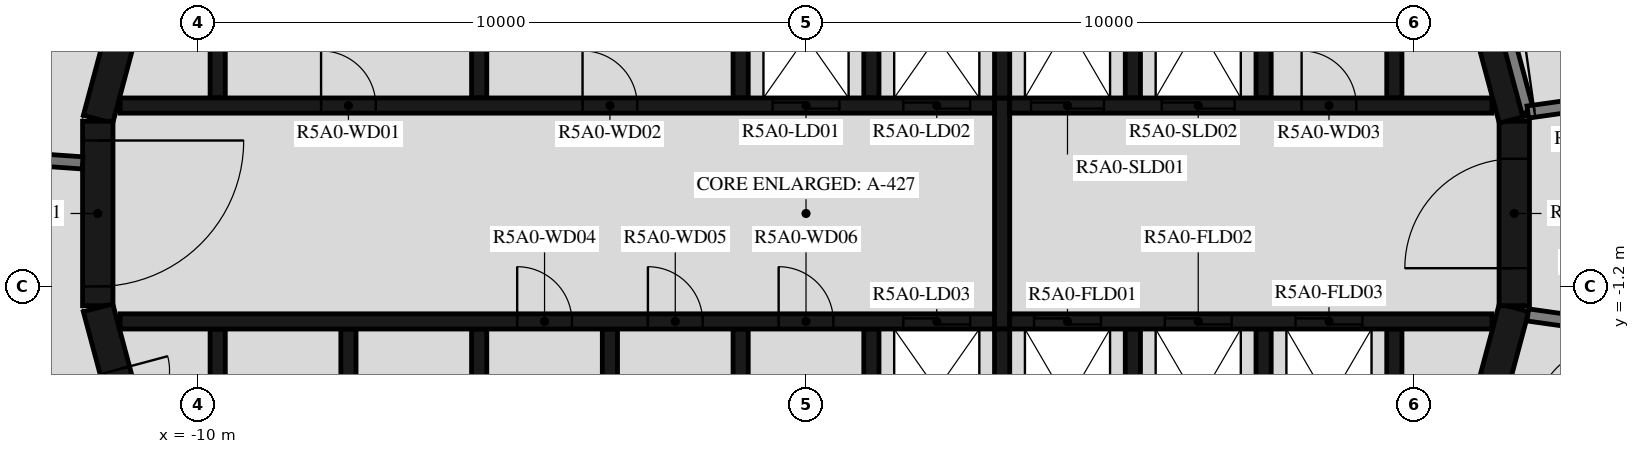
"""IFC4 building model, lengths in metres.
Left out: names, types, materials, properties, quantities, classifications, styles, units other than length and angle.
Written with IfcOpenShell. Run it as: python <this file> out.ifc"""

import sys

from ifc_helpers import new_model, si_unit, direction, frame, frame_2d, origin, place, context, subcontext, project, spatial, polyline, rectangle, outline, extrude, element, fill, save


model = new_model("IFC4")
c1 = context("Model", 3, precision=1e-05, world=origin(), true_north=direction((0.0, 1.0)))
c2 = subcontext(c1, "Body", "Model", "MODEL_VIEW")
j1 = project(units=[si_unit("LENGTHUNIT", "METRE"), si_unit("PLANEANGLEUNIT", "RADIAN")], contexts=[c1])
p1 = place(None, origin())
s1 = spatial("IfcSite", under=j1, at=p1, CompositionType="ELEMENT")
p2 = place(p1, origin())
s2 = spatial("IfcBuilding", under=s1, at=p2, CompositionType="ELEMENT")
p3 = place(p2, frame((0.0, 0.0, 188.4)))
s3 = spatial("IfcBuildingStorey", under=s2, at=p3, CompositionType="ELEMENT", Elevation=188.4)
p4 = place(p3, frame((10.858, -4.479, 0.0), z_axis=(0.0, 0.0, 1.0), x_axis=(0.258734743916, 0.965948410781, 0.0)))
e1 = element("IfcWall", 1, at=p4, inside=s3, PredefinedType="SHEAR", context=c2, shape_type="SweptSolid", body=[
    extrude(rectangle(XDim=3.033, YDim=0.5, at=frame_2d((1.516, 0.0))), origin(), (0.0, 0.0, 1.0), 3.12),
])
p5 = place(p3, frame((11.647, -1.516, 0.0), z_axis=(0.0, 0.0, 1.0), x_axis=(0.0, 1.0, 0.0)))
e2 = element("IfcWall", 2, at=p5, inside=s3, PredefinedType="SHEAR", context=c2, shape_type="SweptSolid", body=[
    extrude(rectangle(XDim=3.033, YDim=0.5, at=frame_2d((1.516, 0.0))), origin(), (0.0, 0.0, 1.0), 3.12),
])
p6 = place(p5, frame((0.616, 0.0, 0.0)))
e3 = element("IfcOpeningElement", 3, at=p6, cuts=e2, PredefinedType="OPENING", context=c2, shape_type="SweptSolid", body=[
    extrude(rectangle(XDim=1.8, YDim=2.1, at=frame_2d((0.9, 1.05))), frame((0.0, 0.26, 0.0), z_axis=(0.0, -1.0, 0.0), x_axis=(1.0, 0.0, 0.0)), (0.0, 0.0, 1.0), 0.52),
])
for number, where, z_axis, x_axis in (
    (4, (11.643, 1.55, 0.0), (0.0, 0.0, 1.0), (-0.259, 0.966, 0.0)),
    (5, (-10.858, 4.479, 0.0), (0.0, 0.0, 1.0), (-0.259, -0.966, 0.0)),
):
    element("IfcWall", number, at=place(p3, frame(where, z_axis=z_axis, x_axis=x_axis)), inside=s3, PredefinedType="SHEAR", context=c2, shape_type="SweptSolid", body=[
        extrude(rectangle(XDim=3.033, YDim=0.5, at=frame_2d((1.516, 0.0))), origin(), (0.0, 0.0, 1.0), 3.12),
    ])
p7 = place(p3, frame((-11.647, 1.516, 0.0), z_axis=(0.0, 0.0, 1.0), x_axis=(0.0, -1.0, 0.0)))
e6 = element("IfcWall", 6, at=p7, inside=s3, PredefinedType="SHEAR", context=c2, shape_type="SweptSolid", body=[
    extrude(rectangle(XDim=3.033, YDim=0.5, at=frame_2d((1.516, 0.0))), origin(), (0.0, 0.0, 1.0), 3.12),
])
p8 = place(p7, frame((0.316, 0.0, 0.0)))
e7 = element("IfcOpeningElement", 7, at=p8, cuts=e6, PredefinedType="OPENING", context=c2, shape_type="SweptSolid", body=[
    extrude(rectangle(XDim=2.4, YDim=2.1, at=frame_2d((1.2, 1.05))), frame((0.0, 0.26, 0.0), z_axis=(0.0, -1.0, 0.0), x_axis=(1.0, 0.0, 0.0)), (0.0, 0.0, 1.0), 0.52),
])
p9 = place(p3, frame((-11.643, -1.55, 0.0), z_axis=(0.0, 0.0, 1.0), x_axis=(0.258734743916, -0.965948410781, 0.0)))
e8 = element("IfcWall", 8, at=p9, inside=s3, PredefinedType="SHEAR", context=c2, shape_type="SweptSolid", body=[
    extrude(rectangle(XDim=3.033, YDim=0.5, at=frame_2d((1.516, 0.0))), origin(), (0.0, 0.0, 1.0), 3.12),
])
p10 = place(p9, frame((1.066, 0.0, 0.0)))
e9 = element("IfcOpeningElement", 9, at=p10, cuts=e8, PredefinedType="OPENING", context=c2, shape_type="SweptSolid", body=[
    extrude(rectangle(XDim=0.9, YDim=2.1, at=frame_2d((0.45, 1.05))), frame((0.0, 0.26, 0.0), z_axis=(0.0, -1.0, 0.0), x_axis=(1.0, 0.0, 0.0)), (0.0, 0.0, 1.0), 0.52),
])
p11 = place(p3, origin())
e10 = element("IfcWall", 10, at=p11, inside=s3, PredefinedType="SHEAR", context=c2, shape_type="SweptSolid", body=[
    extrude(outline(polyline([(-9.55, 4.8), (-5.5, 4.8), (-5.5, 1.9), (-5.25, 1.9), (-5.25, 4.8), (-1.2, 4.8), (-1.2, 1.9), (-0.95, 1.9), (-0.95, 4.8), (0.95, 4.8), (0.95, 1.9), (1.2, 1.9), (1.2, 4.8), (3.1, 4.8), (3.1, 1.9), (3.35, 1.9), (3.35, 4.8), (5.25, 4.8), (5.25, 1.9), (5.5, 1.9), (5.5, 4.8), (7.4, 4.8), (7.4, 1.9), (7.65, 1.9), (7.65, 4.8), (9.55, 4.8), (9.55, 1.9), (9.8, 1.9), (9.8, 4.8), (9.8, 5.05), (-9.8, 5.05), (-9.8, 4.8), (-9.8, 1.9), (-9.55, 1.9), (-9.55, 4.8)])), origin(), (0.0, 0.0, 1.0), 3.12),
])
p12 = place(p3, origin())
e11 = element("IfcWall", 11, at=p12, inside=s3, PredefinedType="SHEAR", context=c2, shape_type="SweptSolid", body=[
    extrude(outline(polyline([(9.8, -5.05), (9.8, -4.8), (9.8, -1.9), (9.55, -1.9), (9.55, -4.8), (7.65, -4.8), (7.65, -1.9), (7.4, -1.9), (7.4, -4.8), (5.5, -4.8), (5.5, -1.9), (5.25, -1.9), (5.25, -4.8), (3.35, -4.8), (3.35, -1.9), (3.1, -1.9), (3.1, -4.8), (1.2, -4.8), (1.2, -1.9), (0.95, -1.9), (0.95, -4.8), (-0.95, -4.8), (-0.95, -1.9), (-1.2, -1.9), (-1.2, -4.8), (-3.1, -4.8), (-3.1, -1.9), (-3.35, -1.9), (-3.35, -4.8), (-5.25, -4.8), (-5.25, -1.9), (-5.5, -1.9), (-5.5, -4.8), (-7.4, -4.8), (-7.4, -1.9), (-7.65, -1.9), (-7.65, -4.8), (-9.55, -4.8), (-9.55, -1.9), (-9.8, -1.9), (-9.8, -4.8), (-9.8, -5.05), (9.8, -5.05)])), origin(), (0.0, 0.0, 1.0), 3.12),
])
p13 = place(p3, frame((-11.28, 1.775, 0.0), z_axis=(0.0, 0.0, 1.0), x_axis=(1.0, 0.0, 0.0)))
e12 = element("IfcWall", 12, at=p13, inside=s3, PredefinedType="SHEAR", context=c2, shape_type="SweptSolid", body=[
    extrude(rectangle(XDim=14.38, YDim=0.25, at=frame_2d((7.19, 0.0))), origin(), (0.0, 0.0, 1.0), 3.12),
])
p14 = place(p13, frame((10.73, 0.0, 0.0)))
e13 = element("IfcOpeningElement", 13, at=p14, cuts=e12, PredefinedType="OPENING", context=c2, shape_type="SweptSolid", body=[
    extrude(rectangle(XDim=1.1, YDim=2.1, at=frame_2d((0.55, 1.05))), frame((0.0, 0.135, 0.0), z_axis=(0.0, -1.0, 0.0), x_axis=(1.0, 0.0, 0.0)), (0.0, 0.0, 1.0), 0.27),
])
p15 = place(p13, frame((12.88, 0.0, 0.0)))
e14 = element("IfcOpeningElement", 14, at=p15, cuts=e12, PredefinedType="OPENING", context=c2, shape_type="SweptSolid", body=[
    extrude(rectangle(XDim=1.1, YDim=2.1, at=frame_2d((0.55, 1.05))), frame((0.0, 0.135, 0.0), z_axis=(0.0, -1.0, 0.0), x_axis=(1.0, 0.0, 0.0)), (0.0, 0.0, 1.0), 0.27),
])
p16 = place(p13, frame((3.305, 0.0, 0.0)))
e15 = element("IfcOpeningElement", 15, at=p16, cuts=e12, PredefinedType="OPENING", context=c2, shape_type="SweptSolid", body=[
    extrude(rectangle(XDim=0.9, YDim=2.1, at=frame_2d((0.45, 1.05))), frame((0.0, 0.135, 0.0), z_axis=(0.0, -1.0, 0.0), x_axis=(1.0, 0.0, 0.0)), (0.0, 0.0, 1.0), 0.27),
])
p17 = place(p13, frame((7.605, 0.0, 0.0)))
e16 = element("IfcOpeningElement", 16, at=p17, cuts=e12, PredefinedType="OPENING", context=c2, shape_type="SweptSolid", body=[
    extrude(rectangle(XDim=0.9, YDim=2.1, at=frame_2d((0.45, 1.05))), frame((0.0, 0.135, 0.0), z_axis=(0.0, -1.0, 0.0), x_axis=(1.0, 0.0, 0.0)), (0.0, 0.0, 1.0), 0.27),
])
p18 = place(p3, frame((3.35, 1.775, 0.0), z_axis=(0.0, 0.0, 1.0), x_axis=(1.0, 0.0, 0.0)))
e17 = element("IfcWall", 17, at=p18, inside=s3, PredefinedType="SHEAR", context=c2, shape_type="SweptSolid", body=[
    extrude(rectangle(XDim=7.93, YDim=0.25, at=frame_2d((3.965, 0.0))), origin(), (0.0, 0.0, 1.0), 3.12),
])
p19 = place(p18, frame((0.35, 0.0, 0.0)))
e18 = element("IfcOpeningElement", 18, at=p19, cuts=e17, PredefinedType="OPENING", context=c2, shape_type="SweptSolid", body=[
    extrude(rectangle(XDim=1.2, YDim=2.4, at=frame_2d((0.6, 1.2))), frame((0.0, 0.135, 0.0), z_axis=(0.0, -1.0, 0.0), x_axis=(1.0, 0.0, 0.0)), (0.0, 0.0, 1.0), 0.27),
])
p20 = place(p18, frame((2.5, 0.0, 0.0)))
e19 = element("IfcOpeningElement", 19, at=p20, cuts=e17, PredefinedType="OPENING", context=c2, shape_type="SweptSolid", body=[
    extrude(rectangle(XDim=1.2, YDim=2.4, at=frame_2d((0.6, 1.2))), frame((0.0, 0.135, 0.0), z_axis=(0.0, -1.0, 0.0), x_axis=(1.0, 0.0, 0.0)), (0.0, 0.0, 1.0), 0.27),
])
p21 = place(p18, frame((4.8, 0.0, 0.0)))
e20 = element("IfcOpeningElement", 20, at=p21, cuts=e17, PredefinedType="OPENING", context=c2, shape_type="SweptSolid", body=[
    extrude(rectangle(XDim=0.9, YDim=2.1, at=frame_2d((0.45, 1.05))), frame((0.0, 0.135, 0.0), z_axis=(0.0, -1.0, 0.0), x_axis=(1.0, 0.0, 0.0)), (0.0, 0.0, 1.0), 0.27),
])
p22 = place(p3, frame((-11.28, -1.775, 0.0), z_axis=(0.0, 0.0, 1.0), x_axis=(1.0, 0.0, 0.0)))
e21 = element("IfcWall", 21, at=p22, inside=s3, PredefinedType="SHEAR", context=c2, shape_type="SweptSolid", body=[
    extrude(rectangle(XDim=14.38, YDim=0.25, at=frame_2d((7.19, 0.0))), origin(), (0.0, 0.0, 1.0), 3.12),
])
p23 = place(p22, frame((12.88, 0.0, 0.0)))
e22 = element("IfcOpeningElement", 22, at=p23, cuts=e21, PredefinedType="OPENING", context=c2, shape_type="SweptSolid", body=[
    extrude(rectangle(XDim=1.1, YDim=2.1, at=frame_2d((0.55, 1.05))), frame((0.0, 0.135, 0.0), z_axis=(0.0, -1.0, 0.0), x_axis=(1.0, 0.0, 0.0)), (0.0, 0.0, 1.0), 0.27),
])
p24 = place(p22, frame((6.53, 0.0, 0.0)))
e23 = element("IfcOpeningElement", 23, at=p24, cuts=e21, PredefinedType="OPENING", context=c2, shape_type="SweptSolid", body=[
    extrude(rectangle(XDim=0.9, YDim=2.1, at=frame_2d((0.45, 1.05))), frame((0.0, 0.135, 0.0), z_axis=(0.0, -1.0, 0.0), x_axis=(1.0, 0.0, 0.0)), (0.0, 0.0, 1.0), 0.27),
])
p25 = place(p22, frame((8.68, 0.0, 0.0)))
e24 = element("IfcOpeningElement", 24, at=p25, cuts=e21, PredefinedType="OPENING", context=c2, shape_type="SweptSolid", body=[
    extrude(rectangle(XDim=0.9, YDim=2.1, at=frame_2d((0.45, 1.05))), frame((0.0, 0.135, 0.0), z_axis=(0.0, -1.0, 0.0), x_axis=(1.0, 0.0, 0.0)), (0.0, 0.0, 1.0), 0.27),
])
p26 = place(p22, frame((10.83, 0.0, 0.0)))
e25 = element("IfcOpeningElement", 25, at=p26, cuts=e21, PredefinedType="OPENING", context=c2, shape_type="SweptSolid", body=[
    extrude(rectangle(XDim=0.9, YDim=2.1, at=frame_2d((0.45, 1.05))), frame((0.0, 0.135, 0.0), z_axis=(0.0, -1.0, 0.0), x_axis=(1.0, 0.0, 0.0)), (0.0, 0.0, 1.0), 0.27),
])
p27 = place(p3, frame((3.35, -1.775, 0.0), z_axis=(0.0, 0.0, 1.0), x_axis=(1.0, 0.0, 0.0)))
e26 = element("IfcWall", 26, at=p27, inside=s3, PredefinedType="SHEAR", context=c2, shape_type="SweptSolid", body=[
    extrude(rectangle(XDim=7.93, YDim=0.25, at=frame_2d((3.965, 0.0))), origin(), (0.0, 0.0, 1.0), 3.12),
])
p28 = place(p27, frame((0.4, 0.0, 0.0)))
e27 = element("IfcOpeningElement", 27, at=p28, cuts=e26, PredefinedType="OPENING", context=c2, shape_type="SweptSolid", body=[
    extrude(rectangle(XDim=1.1, YDim=2.4, at=frame_2d((0.55, 1.2))), frame((0.0, 0.135, 0.0), z_axis=(0.0, -1.0, 0.0), x_axis=(1.0, 0.0, 0.0)), (0.0, 0.0, 1.0), 0.27),
])
p29 = place(p27, frame((2.55, 0.0, 0.0)))
e28 = element("IfcOpeningElement", 28, at=p29, cuts=e26, PredefinedType="OPENING", context=c2, shape_type="SweptSolid", body=[
    extrude(rectangle(XDim=1.1, YDim=2.4, at=frame_2d((0.55, 1.2))), frame((0.0, 0.135, 0.0), z_axis=(0.0, -1.0, 0.0), x_axis=(1.0, 0.0, 0.0)), (0.0, 0.0, 1.0), 0.27),
])
p30 = place(p27, frame((4.7, 0.0, 0.0)))
e29 = element("IfcOpeningElement", 29, at=p30, cuts=e26, PredefinedType="OPENING", context=c2, shape_type="SweptSolid", body=[
    extrude(rectangle(XDim=1.1, YDim=2.4, at=frame_2d((0.55, 1.2))), frame((0.0, 0.135, 0.0), z_axis=(0.0, -1.0, 0.0), x_axis=(1.0, 0.0, 0.0)), (0.0, 0.0, 1.0), 0.27),
])
p31 = place(p3, frame((3.225, -1.9, 0.0), z_axis=(0.0, 0.0, 1.0), x_axis=(0.0, 1.0, 0.0)))
e30 = element("IfcWall", 30, at=p31, inside=s3, PredefinedType="SHEAR", context=c2, shape_type="SweptSolid", body=[
    extrude(rectangle(XDim=3.8, YDim=0.25, at=frame_2d((1.9, 0.0))), origin(), (0.0, 0.0, 1.0), 3.12),
])
p32 = place(p3, frame((11.87, 1.668, 0.0), z_axis=(0.0, 0.0, 1.0), x_axis=(-0.258836880648, 0.965921047093, 0.0)))
e31 = element("IfcWall", 31, at=p32, inside=s3, PredefinedType="STANDARD", context=c2, shape_type="SweptSolid", body=[
    extrude(rectangle(XDim=1.695, YDim=0.2, at=frame_2d((0.848, 0.0))), origin(), (0.0, 0.0, 1.0), 3.12),
])
p33 = place(p3, frame((11.87, 1.668, 0.0), z_axis=(0.0, 0.0, 1.0), x_axis=(0.990271931984, 0.139145609792, 0.0)))
e32 = element("IfcWall", 32, at=p33, inside=s3, PredefinedType="STANDARD", context=c2, shape_type="SweptSolid", body=[
    extrude(rectangle(XDim=1.712, YDim=0.2, at=frame_2d((0.856, 0.0))), origin(), (0.0, 0.0, 1.0), 3.12),
])
p34 = place(p33, frame((0.11, 0.0, 0.0)))
e33 = element("IfcOpeningElement", 33, at=p34, cuts=e32, PredefinedType="OPENING", context=c2, shape_type="SweptSolid", body=[
    extrude(rectangle(XDim=1.2, YDim=2.1, at=frame_2d((0.6, 1.05))), frame((0.0, 0.11, 0.0), z_axis=(0.0, -1.0, 0.0), x_axis=(1.0, 0.0, 0.0)), (0.0, 0.0, 1.0), 0.22),
])
p35 = place(p3, frame((13.618, 2.647, 0.0), z_axis=(0.0, 0.0, 1.0), x_axis=(-0.438366026218, 0.898796543751, 0.0)))
e34 = element("IfcWall", 34, at=p35, inside=s3, PredefinedType="STANDARD", context=c2, shape_type="SweptSolid", body=[
    extrude(rectangle(XDim=7.181, YDim=0.2, at=frame_2d((3.591, 0.0))), origin(), (0.0, 0.0, 1.0), 3.12),
])
p36 = place(p3, frame((-13.367, 0.935, 0.0), z_axis=(0.0, 0.0, 1.0), x_axis=(0.997553656289, -0.069904955655, 0.0)))
e35 = element("IfcWall", 35, at=p36, inside=s3, PredefinedType="STANDARD", context=c2, shape_type="SweptSolid", body=[
    extrude(rectangle(XDim=1.474, YDim=0.2, at=frame_2d((0.737, 0.0))), origin(), (0.0, 0.0, 1.0), 3.12),
])
p37 = place(p3, frame((13.302, -1.869, 0.0), z_axis=(0.0, 0.0, 1.0), x_axis=(-0.990274397042, 0.13912806533, 0.0)))
e36 = element("IfcWall", 36, at=p37, inside=s3, PredefinedType="STANDARD", context=c2, shape_type="SweptSolid", body=[
    extrude(rectangle(XDim=1.446, YDim=0.2, at=frame_2d((0.723, 0.0))), origin(), (0.0, 0.0, 1.0), 3.12),
])
p38 = place(p3, frame((22.598, 2.345, 0.0), z_axis=(0.0, 0.0, 1.0), x_axis=(-0.829034113947, 0.559198031034, 0.0)))
e37 = element("IfcWall", 37, at=p38, inside=s3, PredefinedType="PARTITIONING", context=c2, shape_type="SweptSolid", body=[
    extrude(rectangle(XDim=12.879, YDim=0.12, at=frame_2d((6.439, 0.0))), origin(), (0.0, 0.0, 1.0), 3.12),
])
p39 = place(p38, frame((0.2, 0.0, 0.0)))
e38 = element("IfcOpeningElement", 38, at=p39, cuts=e37, PredefinedType="OPENING", context=c2, shape_type="SweptSolid", body=[
    extrude(rectangle(XDim=0.9, YDim=2.1, at=frame_2d((0.45, 1.05))), frame((0.0, 0.07, 0.0), z_axis=(0.0, -1.0, 0.0), x_axis=(1.0, 0.0, 0.0)), (0.0, 0.0, 1.0), 0.14),
])
p40 = place(p8, origin())
e39 = element("IfcDoor", 39, at=p40, inside=s3, OperationType="DOUBLE_DOOR_SINGLE_SWING", PredefinedType="DOOR", context=c2, shape_type="SweptSolid", body=[
    extrude(rectangle(XDim=2.4, YDim=2.1, at=frame_2d((1.2, 1.05))), frame((0.0, 0.025, 0.0), z_axis=(0.0, -1.0, 0.0), x_axis=(1.0, 0.0, 0.0)), (0.0, 0.0, 1.0), 0.05),
])
fill(e7, e39)
p41 = place(p6, origin())
e40 = element("IfcDoor", 40, at=p41, inside=s3, OperationType="DOUBLE_DOOR_SINGLE_SWING", PredefinedType="DOOR", context=c2, shape_type="SweptSolid", body=[
    extrude(rectangle(XDim=1.8, YDim=2.1, at=frame_2d((0.9, 1.05))), frame((0.0, 0.025, 0.0), z_axis=(0.0, -1.0, 0.0), x_axis=(1.0, 0.0, 0.0)), (0.0, 0.0, 1.0), 0.05),
])
fill(e3, e40)
p42 = place(p14, origin())
e41 = element("IfcDoor", 41, at=p42, inside=s3, OperationType="DOUBLE_DOOR_SLIDING", PredefinedType="DOOR", context=c2, shape_type="SweptSolid", body=[
    extrude(rectangle(XDim=1.1, YDim=2.1, at=frame_2d((0.55, 1.05))), frame((0.0, 0.025, 0.0), z_axis=(0.0, -1.0, 0.0), x_axis=(1.0, 0.0, 0.0)), (0.0, 0.0, 1.0), 0.05),
])
fill(e13, e41)
p43 = place(p15, origin())
e42 = element("IfcDoor", 42, at=p43, inside=s3, OperationType="DOUBLE_DOOR_SLIDING", PredefinedType="DOOR", context=c2, shape_type="SweptSolid", body=[
    extrude(rectangle(XDim=1.1, YDim=2.1, at=frame_2d((0.55, 1.05))), frame((0.0, 0.025, 0.0), z_axis=(0.0, -1.0, 0.0), x_axis=(1.0, 0.0, 0.0)), (0.0, 0.0, 1.0), 0.05),
])
fill(e14, e42)
p44 = place(p19, origin())
e43 = element("IfcDoor", 43, at=p44, inside=s3, OperationType="DOUBLE_DOOR_SLIDING", PredefinedType="DOOR", context=c2, shape_type="SweptSolid", body=[
    extrude(rectangle(XDim=1.2, YDim=2.4, at=frame_2d((0.6, 1.2))), frame((0.0, 0.025, 0.0), z_axis=(0.0, -1.0, 0.0), x_axis=(1.0, 0.0, 0.0)), (0.0, 0.0, 1.0), 0.05),
])
fill(e18, e43)
p45 = place(p20, origin())
e44 = element("IfcDoor", 44, at=p45, inside=s3, OperationType="DOUBLE_DOOR_SLIDING", PredefinedType="DOOR", context=c2, shape_type="SweptSolid", body=[
    extrude(rectangle(XDim=1.2, YDim=2.4, at=frame_2d((0.6, 1.2))), frame((0.0, 0.025, 0.0), z_axis=(0.0, -1.0, 0.0), x_axis=(1.0, 0.0, 0.0)), (0.0, 0.0, 1.0), 0.05),
])
fill(e19, e44)
p46 = place(p23, origin())
e45 = element("IfcDoor", 45, at=p46, inside=s3, OperationType="DOUBLE_DOOR_SLIDING", PredefinedType="DOOR", context=c2, shape_type="SweptSolid", body=[
    extrude(rectangle(XDim=1.1, YDim=2.1, at=frame_2d((0.55, 1.05))), frame((0.0, 0.025, 0.0), z_axis=(0.0, -1.0, 0.0), x_axis=(1.0, 0.0, 0.0)), (0.0, 0.0, 1.0), 0.05),
])
fill(e22, e45)
p47 = place(p28, origin())
e46 = element("IfcDoor", 46, at=p47, inside=s3, OperationType="DOUBLE_DOOR_SLIDING", PredefinedType="DOOR", context=c2, shape_type="SweptSolid", body=[
    extrude(rectangle(XDim=1.1, YDim=2.4, at=frame_2d((0.55, 1.2))), frame((0.0, 0.025, 0.0), z_axis=(0.0, -1.0, 0.0), x_axis=(1.0, 0.0, 0.0)), (0.0, 0.0, 1.0), 0.05),
])
fill(e27, e46)
p48 = place(p29, origin())
e47 = element("IfcDoor", 47, at=p48, inside=s3, OperationType="DOUBLE_DOOR_SLIDING", PredefinedType="DOOR", context=c2, shape_type="SweptSolid", body=[
    extrude(rectangle(XDim=1.1, YDim=2.4, at=frame_2d((0.55, 1.2))), frame((0.0, 0.025, 0.0), z_axis=(0.0, -1.0, 0.0), x_axis=(1.0, 0.0, 0.0)), (0.0, 0.0, 1.0), 0.05),
])
fill(e28, e47)
p49 = place(p30, origin())
e48 = element("IfcDoor", 48, at=p49, inside=s3, OperationType="DOUBLE_DOOR_SLIDING", PredefinedType="DOOR", context=c2, shape_type="SweptSolid", body=[
    extrude(rectangle(XDim=1.1, YDim=2.4, at=frame_2d((0.55, 1.2))), frame((0.0, 0.025, 0.0), z_axis=(0.0, -1.0, 0.0), x_axis=(1.0, 0.0, 0.0)), (0.0, 0.0, 1.0), 0.05),
])
fill(e29, e48)
p50 = place(p16, origin())
e49 = element("IfcDoor", 49, at=p50, inside=s3, OperationType="SINGLE_SWING_LEFT", PredefinedType="DOOR", context=c2, shape_type="SweptSolid", body=[
    extrude(rectangle(XDim=0.9, YDim=2.1, at=frame_2d((0.45, 1.05))), frame((0.0, 0.025, 0.0), z_axis=(0.0, -1.0, 0.0), x_axis=(1.0, 0.0, 0.0)), (0.0, 0.0, 1.0), 0.05),
])
fill(e15, e49)
p51 = place(p17, origin())
e50 = element("IfcDoor", 50, at=p51, inside=s3, OperationType="SINGLE_SWING_RIGHT", PredefinedType="DOOR", context=c2, shape_type="SweptSolid", body=[
    extrude(rectangle(XDim=0.9, YDim=2.1, at=frame_2d((0.45, 1.05))), frame((0.0, 0.025, 0.0), z_axis=(0.0, -1.0, 0.0), x_axis=(1.0, 0.0, 0.0)), (0.0, 0.0, 1.0), 0.05),
])
fill(e16, e50)
p52 = place(p21, origin())
e51 = element("IfcDoor", 51, at=p52, inside=s3, OperationType="SINGLE_SWING_LEFT", PredefinedType="DOOR", context=c2, shape_type="SweptSolid", body=[
    extrude(rectangle(XDim=0.9, YDim=2.1, at=frame_2d((0.45, 1.05))), frame((0.0, 0.025, 0.0), z_axis=(0.0, -1.0, 0.0), x_axis=(1.0, 0.0, 0.0)), (0.0, 0.0, 1.0), 0.05),
])
fill(e20, e51)
p53 = place(p24, origin())
e52 = element("IfcDoor", 52, at=p53, inside=s3, OperationType="SINGLE_SWING_RIGHT", PredefinedType="DOOR", context=c2, shape_type="SweptSolid", body=[
    extrude(rectangle(XDim=0.9, YDim=2.1, at=frame_2d((0.45, 1.05))), frame((0.0, 0.025, 0.0), z_axis=(0.0, -1.0, 0.0), x_axis=(1.0, 0.0, 0.0)), (0.0, 0.0, 1.0), 0.05),
])
fill(e23, e52)
p54 = place(p25, origin())
e53 = element("IfcDoor", 53, at=p54, inside=s3, OperationType="SINGLE_SWING_LEFT", PredefinedType="DOOR", context=c2, shape_type="SweptSolid", body=[
    extrude(rectangle(XDim=0.9, YDim=2.1, at=frame_2d((0.45, 1.05))), frame((0.0, 0.025, 0.0), z_axis=(0.0, -1.0, 0.0), x_axis=(1.0, 0.0, 0.0)), (0.0, 0.0, 1.0), 0.05),
])
fill(e24, e53)
p55 = place(p26, origin())
e54 = element("IfcDoor", 54, at=p55, inside=s3, OperationType="SINGLE_SWING_RIGHT", PredefinedType="DOOR", context=c2, shape_type="SweptSolid", body=[
    extrude(rectangle(XDim=0.9, YDim=2.1, at=frame_2d((0.45, 1.05))), frame((0.0, 0.025, 0.0), z_axis=(0.0, -1.0, 0.0), x_axis=(1.0, 0.0, 0.0)), (0.0, 0.0, 1.0), 0.05),
])
fill(e25, e54)
p56 = place(p10, origin())
e55 = element("IfcDoor", 55, at=p56, inside=s3, OperationType="SINGLE_SWING_LEFT", PredefinedType="DOOR", context=c2, shape_type="SweptSolid", body=[
    extrude(rectangle(XDim=0.9, YDim=2.1, at=frame_2d((0.45, 1.05))), frame((0.0, 0.025, 0.0), z_axis=(0.0, -1.0, 0.0), x_axis=(1.0, 0.0, 0.0)), (0.0, 0.0, 1.0), 0.05),
])
fill(e9, e55)
p57 = place(p34, origin())
e56 = element("IfcDoor", 56, at=p57, inside=s3, OperationType="DOUBLE_DOOR_SINGLE_SWING", PredefinedType="DOOR", context=c2, shape_type="SweptSolid", body=[
    extrude(rectangle(XDim=1.2, YDim=2.1, at=frame_2d((0.6, 1.05))), frame((0.0, 0.025, 0.0), z_axis=(0.0, -1.0, 0.0), x_axis=(1.0, 0.0, 0.0)), (0.0, 0.0, 1.0), 0.05),
])
fill(e33, e56)
save(model, sys.argv[1])
